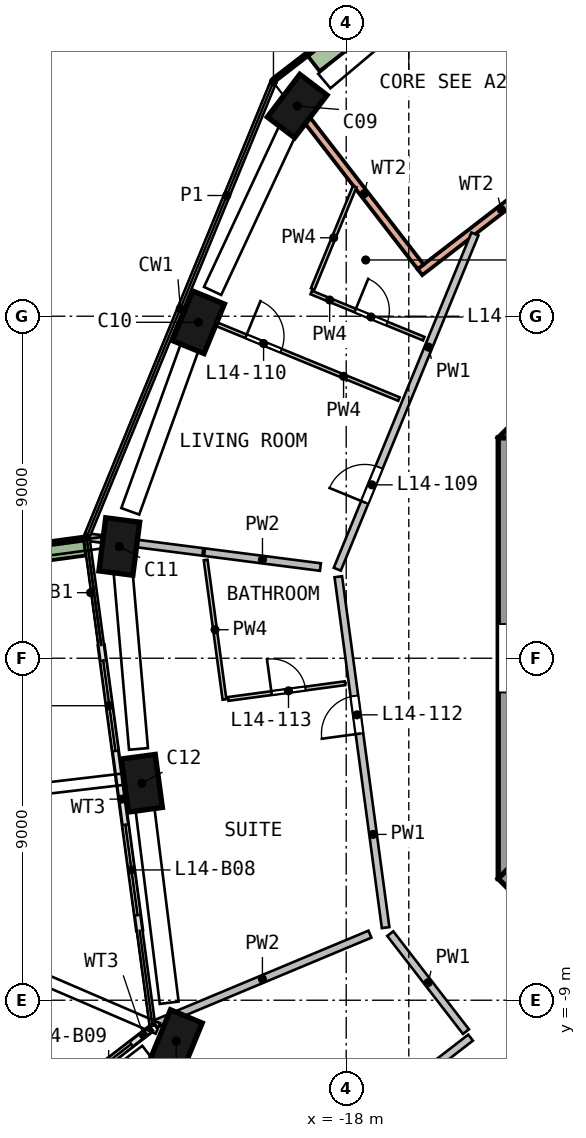
"""IFC4 building model, lengths in metres.
Left out: names, types, materials, properties, quantities, classifications, styles, units other than length and angle.
Written with IfcOpenShell. Run it as: python <this file> out.ifc"""

import sys

from ifc_helpers import new_model, si_unit, direction, frame, frame_2d, origin, origin_2d, place, context, subcontext, project, spatial, rectangle, extrude, element, fill, save


model = new_model("IFC4")
c1 = context("Model", 3, precision=1e-05, world=origin(), true_north=direction((0.0, 1.0)))
c2 = subcontext(c1, "Body", "Model", "MODEL_VIEW")
j1 = project(units=[si_unit("LENGTHUNIT", "METRE"), si_unit("PLANEANGLEUNIT", "RADIAN")], contexts=[c1])
p1 = place(None, origin())
s1 = spatial("IfcSite", under=j1, at=p1, CompositionType="ELEMENT")
p2 = place(p1, origin())
s2 = spatial("IfcBuilding", under=s1, at=p2, CompositionType="ELEMENT")
p3 = place(p2, frame((0.0, 0.0, 64.5)))
s3 = spatial("IfcBuildingStorey", under=s2, at=p3, CompositionType="ELEMENT", Elevation=64.5)
p4 = place(p3, frame((-19.207, 14.642, 0.0), z_axis=(-0.068881333, -0.091917805, 0.993381336), x_axis=(0.602440635, 0.789856126, 0.114858968)))
e1 = element("IfcColumn", 1, at=p4, inside=s3, PredefinedType="COLUMN", context=c2, shape_type="SweptSolid", body=[
    extrude(rectangle(XDim=1.4, YDim=0.9, at=origin_2d()), origin(), (0.0, 0.0, 1.0), 3.211),
])
p5 = place(p3, frame((-21.84, 8.966, 0.0), z_axis=(-0.041751597, -0.104264917, 0.993672799), x_axis=(-0.377203026, -0.919295603, -0.112309715)))
e2 = element("IfcColumn", 2, at=p5, inside=s3, PredefinedType="COLUMN", context=c2, shape_type="SweptSolid", body=[
    extrude(rectangle(XDim=1.4, YDim=0.9, at=origin_2d()), origin(), (0.0, 0.0, 1.0), 3.21),
])
p6 = place(p3, frame((-23.954, 3.077, 0.0), z_axis=(-0.013685038, -0.11404198, 0.993381672), x_axis=(0.126725729, 0.985265789, 0.114856063)))
e3 = element("IfcColumn", 3, at=p6, inside=s3, PredefinedType="COLUMN", context=c2, shape_type="SweptSolid", body=[
    extrude(rectangle(XDim=1.4, YDim=0.9, at=origin_2d()), origin(), (0.0, 0.0, 1.0), 3.211),
])
p7 = place(p3, frame((-23.396, -3.155, 0.0), z_axis=(0.015894502, -0.111185465, 0.99367256), x_axis=(0.132268988, -0.984830426, -0.112311825)))
e4 = element("IfcColumn", 4, at=p7, inside=s3, PredefinedType="COLUMN", context=c2, shape_type="SweptSolid", body=[
    extrude(rectangle(XDim=1.4, YDim=0.9, at=origin_2d()), origin(), (0.0, 0.0, 1.0), 3.21),
])
p8 = place(p3, frame((-22.531, -9.947, 0.0), z_axis=(0.048189103, -0.106715301, 0.993121168), x_axis=(0.384858394, 0.91949082, 0.080128952)))
e5 = element("IfcColumn", 5, at=p8, inside=s3, PredefinedType="COLUMN", context=c2, shape_type="SweptSolid", body=[
    extrude(rectangle(XDim=1.4, YDim=0.9, at=origin_2d()), origin(), (0.0, 0.0, 1.0), 3.212),
])
p9 = place(p3, frame((-5.481, 13.682, 0.0), z_axis=(0.0, 0.0, 1.0), x_axis=(-0.707106781, -0.707106781, 0.0)))
e6 = element("IfcWall", 6, at=p9, inside=s3, PredefinedType="SHEAR", context=c2, shape_type="SweptSolid", body=[
    extrude(rectangle(XDim=11.598, YDim=0.9, at=frame_2d((5.799, 0.0))), origin(), (0.0, 0.0, 1.0), 3.5),
])
p10 = place(p3, frame((-13.55, 5.799, 0.0), z_axis=(0.0, 0.0, 1.0), x_axis=(0.0, -1.0, 0.0)))
e7 = element("IfcWall", 7, at=p10, inside=s3, PredefinedType="SHEAR", context=c2, shape_type="SweptSolid", body=[
    extrude(rectangle(XDim=11.598, YDim=0.9, at=frame_2d((5.799, 0.0))), origin(), (0.0, 0.0, 1.0), 3.5),
])
p11 = place(p10, frame((4.899, 0.0, 0.0)))
e8 = element("IfcOpeningElement", 8, at=p11, cuts=e7, PredefinedType="OPENING", context=c2, shape_type="SweptSolid", body=[
    extrude(rectangle(XDim=1.8, YDim=2.1, at=frame_2d((0.9, 1.05))), frame((0.0, 0.46, 0.0), z_axis=(0.0, -1.0, 0.0), x_axis=(1.0, 0.0, 0.0)), (0.0, 0.0, 1.0), 0.92),
])
p12 = place(p3, frame((-13.682, -5.481, 0.0), z_axis=(0.0, 0.0, 1.0), x_axis=(0.707106781, -0.707106781, 0.0)))
e9 = element("IfcWall", 9, at=p12, inside=s3, PredefinedType="SHEAR", context=c2, shape_type="SweptSolid", body=[
    extrude(rectangle(XDim=11.598, YDim=0.9, at=frame_2d((5.799, 0.0))), origin(), (0.0, 0.0, 1.0), 3.5),
])
p13 = place(p12, frame((2.099, 0.0, 0.0)))
e10 = element("IfcOpeningElement", 10, at=p13, cuts=e9, PredefinedType="OPENING", context=c2, shape_type="SweptSolid", body=[
    extrude(rectangle(XDim=1.2, YDim=2.1, at=frame_2d((0.6, 1.05))), frame((0.0, 0.46, 0.0), z_axis=(0.0, -1.0, 0.0), x_axis=(1.0, 0.0, 0.0)), (0.0, 0.0, 1.0), 0.92),
])
p14 = place(p3, frame((-24.448, 0.336, 0.0), z_axis=(0.0, 0.0, 1.0), x_axis=(0.133660502, -0.991027179, 0.0)))
e11 = element("IfcWall", 11, at=p14, inside=s3, PredefinedType="SOLIDWALL", context=c2, shape_type="SweptSolid", body=[
    extrude(rectangle(XDim=3.6, YDim=0.15, at=frame_2d((1.8, 0.0))), origin(), (0.0, 0.0, 1.0), 2.425),
])
p15 = place(p14, frame((0.4, 0.0, 0.0)))
e12 = element("IfcOpeningElement", 12, at=p15, cuts=e11, PredefinedType="OPENING", context=c2, shape_type="SweptSolid", body=[
    extrude(rectangle(XDim=2.4, YDim=2.4, at=frame_2d((1.2, 1.2))), frame((0.0, 0.085, 0.0), z_axis=(0.0, -1.0, 0.0), x_axis=(1.0, 0.0, 0.0)), (0.0, 0.0, 1.0), 0.17),
])
p16 = place(p3, frame((-23.966, -3.232, 0.0), z_axis=(0.0, 0.0, 1.0), x_axis=(0.133649548, -0.991028657, 0.0)))
e13 = element("IfcWall", 13, at=p16, inside=s3, PredefinedType="SOLIDWALL", context=c2, shape_type="SweptSolid", body=[
    extrude(rectangle(XDim=3.96, YDim=0.15, at=frame_2d((1.98, 0.0))), origin(), (0.0, 0.0, 1.0), 2.425),
])
p17 = place(p16, frame((1.16, 0.0, 0.0)))
e14 = element("IfcOpeningElement", 14, at=p17, cuts=e13, PredefinedType="OPENING", context=c2, shape_type="SweptSolid", body=[
    extrude(rectangle(XDim=2.4, YDim=2.4, at=frame_2d((1.2, 1.2))), frame((0.0, 0.085, 0.0), z_axis=(0.0, -1.0, 0.0), x_axis=(1.0, 0.0, 0.0)), (0.0, 0.0, 1.0), 0.17),
])
p18 = place(p3, frame((-23.182, -9.786, 0.0), z_axis=(0.0, 0.0, 1.0), x_axis=(-0.791418042, -0.611275292, 0.0)))
e15 = element("IfcWall", 15, at=p18, inside=s3, PredefinedType="SOLIDWALL", context=c2, shape_type="SweptSolid", body=[
    extrude(rectangle(XDim=2.502, YDim=0.15, at=frame_2d((1.251, 0.0))), origin(), (0.0, 0.0, 1.0), 2.425),
])
p19 = place(p18, frame((0.602, 0.0, 0.0)))
e16 = element("IfcOpeningElement", 16, at=p19, cuts=e15, PredefinedType="OPENING", context=c2, shape_type="SweptSolid", body=[
    extrude(rectangle(XDim=1.5, YDim=2.4, at=frame_2d((0.75, 1.2))), frame((0.0, 0.085, 0.0), z_axis=(0.0, -1.0, 0.0), x_axis=(1.0, 0.0, 0.0)), (0.0, 0.0, 1.0), 0.17),
])
p20 = place(p3, frame((-24.877, 2.952, 0.0), z_axis=(0.0, 0.0, 1.0), x_axis=(-0.991031531, -0.133628231, 0.0)))
e17 = element("IfcWall", 17, at=p20, inside=s3, PredefinedType="SOLIDWALL", context=c2, shape_type="SweptSolid", body=[
    extrude(rectangle(XDim=3.199, YDim=0.5, at=frame_2d((1.6, 0.0))), origin(), (0.0, 0.0, 1.0), 0.7),
])
p21 = place(p3, frame((-16.06, 10.161, 0.0), z_axis=(0.0, 0.0, 1.0), x_axis=(0.791439855, 0.61124705, 0.0)))
e18 = element("IfcWall", 18, at=p21, inside=s3, PredefinedType="SOLIDWALL", context=c2, shape_type="SweptSolid", body=[
    extrude(rectangle(XDim=13.0, YDim=0.2, at=frame_2d((6.5, 0.0))), origin(), (0.0, 0.0, 1.0), 3.19),
])
p22 = place(p21, frame((5.6, 0.0, 0.0)))
e19 = element("IfcOpeningElement", 19, at=p22, cuts=e18, PredefinedType="OPENING", context=c2, shape_type="SweptSolid", body=[
    extrude(rectangle(XDim=1.8, YDim=2.4, at=frame_2d((0.9, 1.2))), frame((0.0, 0.11, 0.0), z_axis=(0.0, -1.0, 0.0), x_axis=(1.0, 0.0, 0.0)), (0.0, 0.0, 1.0), 0.22),
])
p23 = place(p3, frame((-19.013, 14.148, 0.0), z_axis=(0.0, 0.0, 1.0), x_axis=(0.611238783, -0.79144624, 0.0)))
e20 = element("IfcWall", 20, at=p23, inside=s3, PredefinedType="SOLIDWALL", context=c2, shape_type="SweptSolid", body=[
    extrude(rectangle(XDim=4.861, YDim=0.2, at=frame_2d((2.43, 0.0))), origin(), (0.0, 0.0, 1.0), 3.19),
])
p24 = place(p3, frame((-9.716, 23.083, 0.0), z_axis=(0.0, 0.0, 1.0), x_axis=(-0.791441368, -0.611245091, 0.0)))
e21 = element("IfcWall", 21, at=p24, inside=s3, PredefinedType="SOLIDWALL", context=c2, shape_type="SweptSolid", body=[
    extrude(rectangle(XDim=12.84, YDim=0.1, at=frame_2d((6.42, 0.0))), origin(), (0.0, 0.0, 1.0), 0.7),
])
p25 = place(p3, frame((-15.532, 18.213, 0.0), z_axis=(0.0, 0.0, 1.0), x_axis=(-0.791433349, -0.611255474, 0.0)))
e22 = element("IfcWall", 22, at=p25, inside=s3, PredefinedType="SOLIDWALL", context=c2, shape_type="SweptSolid", body=[
    extrude(rectangle(XDim=4.198, YDim=0.5, at=frame_2d((2.099, 0.0))), origin(), (0.0, 0.0, 1.0), 0.7),
])
p26 = place(p3, frame((-27.486, -19.838, 0.0), z_axis=(0.0, 0.0, 1.0), x_axis=(0.791431192, 0.611258267, 0.0)))
e23 = element("IfcWall", 23, at=p26, inside=s3, PredefinedType="SOLIDWALL", context=c2, shape_type="SweptSolid", body=[
    extrude(rectangle(XDim=16.121, YDim=0.2, at=frame_2d((8.061, 0.0))), origin(), (0.0, 0.0, 1.0), 3.19),
])
p27 = place(p26, frame((10.16, 0.0, 0.0)))
e24 = element("IfcOpeningElement", 24, at=p27, cuts=e23, PredefinedType="OPENING", context=c2, shape_type="SweptSolid", body=[
    extrude(rectangle(XDim=1.0, YDim=2.1, at=frame_2d((0.5, 1.05))), frame((0.0, 0.11, 0.0), z_axis=(0.0, -1.0, 0.0), x_axis=(1.0, 0.0, 0.0)), (0.0, 0.0, 1.0), 0.22),
])
p28 = place(p3, frame((-16.963, -7.089, 0.0), z_axis=(0.0, 0.0, 1.0), x_axis=(-0.133643157, 0.991029519, 0.0)))
e25 = element("IfcWall", 25, at=p28, inside=s3, PredefinedType="SOLIDWALL", context=c2, shape_type="SweptSolid", body=[
    extrude(rectangle(XDim=9.317, YDim=0.2, at=frame_2d((4.658, 0.0))), origin(), (0.0, 0.0, 1.0), 3.19),
])
p29 = place(p28, frame((5.15, 0.0, 0.0)))
e26 = element("IfcOpeningElement", 26, at=p29, cuts=e25, PredefinedType="OPENING", context=c2, shape_type="SweptSolid", body=[
    extrude(rectangle(XDim=1.0, YDim=2.1, at=frame_2d((0.5, 1.05))), frame((0.0, 0.11, 0.0), z_axis=(0.0, -1.0, 0.0), x_axis=(1.0, 0.0, 0.0)), (0.0, 0.0, 1.0), 0.22),
])
p30 = place(p3, frame((-18.235, 2.342, 0.0), z_axis=(0.0, 0.0, 1.0), x_axis=(0.379774903, 0.925078928, 0.0)))
e27 = element("IfcWall", 27, at=p30, inside=s3, PredefinedType="SOLIDWALL", context=c2, shape_type="SweptSolid", body=[
    extrude(rectangle(XDim=9.537, YDim=0.2, at=frame_2d((4.769, 0.0))), origin(), (0.0, 0.0, 1.0), 3.19),
])
p31 = place(p30, frame((1.9, 0.0, 0.0)))
e28 = element("IfcOpeningElement", 28, at=p31, cuts=e27, PredefinedType="OPENING", context=c2, shape_type="SweptSolid", body=[
    extrude(rectangle(XDim=1.0, YDim=2.1, at=frame_2d((0.5, 1.05))), frame((0.0, 0.11, 0.0), z_axis=(0.0, -1.0, 0.0), x_axis=(1.0, 0.0, 0.0)), (0.0, 0.0, 1.0), 0.22),
])
p32 = place(p3, frame((-16.841, -7.247, 0.0), z_axis=(0.0, 0.0, 1.0), x_axis=(0.611281148, -0.791413519, 0.0)))
e29 = element("IfcWall", 29, at=p32, inside=s3, PredefinedType="SOLIDWALL", context=c2, shape_type="SweptSolid", body=[
    extrude(rectangle(XDim=3.258, YDim=0.2, at=frame_2d((1.629, 0.0))), origin(), (0.0, 0.0, 1.0), 3.19),
])
p33 = place(p3, frame((-21.774, 2.797, 0.0), z_axis=(0.0, 0.0, 1.0), x_axis=(-0.991855686, 0.127366788, 0.0)))
e30 = element("IfcWall", 30, at=p33, inside=s3, PredefinedType="SOLIDWALL", context=c2, shape_type="SweptSolid", body=[
    extrude(rectangle(XDim=3.011, YDim=0.2, at=frame_2d((1.506, 0.0))), origin(), (0.0, 0.0, 1.0), 3.19),
])
p34 = place(p3, frame((-17.376, -7.261, 0.0), z_axis=(0.0, 0.0, 1.0), x_axis=(-0.922670031, -0.385590475, 0.0)))
e31 = element("IfcWall", 31, at=p34, inside=s3, PredefinedType="SOLIDWALL", context=c2, shape_type="SweptSolid", body=[
    extrude(rectangle(XDim=6.132, YDim=0.2, at=frame_2d((3.066, 0.0))), origin(), (0.0, 0.0, 1.0), 3.19),
])
p35 = place(p3, frame((-18.678, 2.399, 0.0), z_axis=(0.0, 0.0, 1.0), x_axis=(-0.991846962, 0.127434708, 0.0)))
e32 = element("IfcWall", 32, at=p35, inside=s3, PredefinedType="SOLIDWALL", context=c2, shape_type="SweptSolid", body=[
    extrude(rectangle(XDim=3.075, YDim=0.2, at=frame_2d((1.538, 0.0))), origin(), (0.0, 0.0, 1.0), 3.19),
])
p36 = place(p3, frame((-21.204, -1.085, 0.0), z_axis=(0.0, 0.0, 1.0), x_axis=(-0.13360997, 0.991033993, 0.0)))
e33 = element("IfcWall", 33, at=p36, inside=s3, PredefinedType="PARTITIONING", context=c2, shape_type="SweptSolid", body=[
    extrude(rectangle(XDim=3.704, YDim=0.1, at=frame_2d((1.852, 0.0))), origin(), (0.0, 0.0, 1.0), 3.19),
])
p37 = place(p3, frame((-21.104, -1.072, 0.0), z_axis=(0.0, 0.0, 1.0), x_axis=(0.991029396, 0.133644063, 0.0)))
e34 = element("IfcWall", 34, at=p37, inside=s3, PredefinedType="PARTITIONING", context=c2, shape_type="SweptSolid", body=[
    extrude(rectangle(XDim=3.1, YDim=0.1, at=frame_2d((1.55, 0.0))), origin(), (0.0, 0.0, 1.0), 3.19),
])
p38 = place(p37, frame((1.15, 0.0, 0.0)))
e35 = element("IfcOpeningElement", 35, at=p38, cuts=e34, PredefinedType="OPENING", context=c2, shape_type="SweptSolid", body=[
    extrude(rectangle(XDim=0.9, YDim=2.1, at=frame_2d((0.45, 1.05))), frame((0.0, 0.06, 0.0), z_axis=(0.0, -1.0, 0.0), x_axis=(1.0, 0.0, 0.0)), (0.0, 0.0, 1.0), 0.12),
])
p39 = place(p3, frame((-22.302, 9.156, 0.0), z_axis=(0.0, 0.0, 1.0), x_axis=(0.925087816, -0.379753253, 0.0)))
e36 = element("IfcWall", 36, at=p39, inside=s3, PredefinedType="PARTITIONING", context=c2, shape_type="SweptSolid", body=[
    extrude(rectangle(XDim=6.15, YDim=0.1, at=frame_2d((3.075, 0.0))), origin(), (0.0, 0.0, 1.0), 3.19),
])
p40 = place(p39, frame((1.8, 0.0, 0.0)))
e37 = element("IfcOpeningElement", 37, at=p40, cuts=e36, PredefinedType="OPENING", context=c2, shape_type="SweptSolid", body=[
    extrude(rectangle(XDim=1.0, YDim=2.1, at=frame_2d((0.5, 1.05))), frame((0.0, 0.06, 0.0), z_axis=(0.0, -1.0, 0.0), x_axis=(1.0, 0.0, 0.0)), (0.0, 0.0, 1.0), 0.12),
])
p41 = place(p3, frame((-17.777, 12.411, 0.0), z_axis=(0.0, 0.0, 1.0), x_axis=(-0.379788186, -0.925073475, 0.0)))
e38 = element("IfcWall", 38, at=p41, inside=s3, PredefinedType="PARTITIONING", context=c2, shape_type="SweptSolid", body=[
    extrude(rectangle(XDim=2.912, YDim=0.1, at=frame_2d((1.456, 0.0))), origin(), (0.0, 0.0, 1.0), 3.19),
])
p42 = place(p3, frame((-18.92, 9.625, 0.0), z_axis=(0.0, 0.0, 1.0), x_axis=(0.925097844, -0.379728822, 0.0)))
e39 = element("IfcWall", 39, at=p42, inside=s3, PredefinedType="PARTITIONING", context=c2, shape_type="SweptSolid", body=[
    extrude(rectangle(XDim=3.2, YDim=0.1, at=frame_2d((1.6, 0.0))), origin(), (0.0, 0.0, 1.0), 3.19),
])
p43 = place(p42, frame((1.25, 0.0, 0.0)))
e40 = element("IfcOpeningElement", 40, at=p43, cuts=e39, PredefinedType="OPENING", context=c2, shape_type="SweptSolid", body=[
    extrude(rectangle(XDim=0.9, YDim=2.1, at=frame_2d((0.45, 1.05))), frame((0.0, 0.06, 0.0), z_axis=(0.0, -1.0, 0.0), x_axis=(1.0, 0.0, 0.0)), (0.0, 0.0, 1.0), 0.12),
])
p44 = place(p15, origin())
e41 = element("IfcDoor", 41, at=p44, inside=s3, OperationType="SLIDING_TO_RIGHT", PredefinedType="DOOR", context=c2, shape_type="SweptSolid", body=[
    extrude(rectangle(XDim=2.4, YDim=2.4, at=frame_2d((1.2, 1.2))), frame((0.0, 0.025, 0.0), z_axis=(0.0, -1.0, 0.0), x_axis=(1.0, 0.0, 0.0)), (0.0, 0.0, 1.0), 0.05),
])
fill(e12, e41)
p45 = place(p17, origin())
e42 = element("IfcDoor", 42, at=p45, inside=s3, OperationType="SLIDING_TO_LEFT", PredefinedType="DOOR", context=c2, shape_type="SweptSolid", body=[
    extrude(rectangle(XDim=2.4, YDim=2.4, at=frame_2d((1.2, 1.2))), frame((0.0, 0.025, 0.0), z_axis=(0.0, -1.0, 0.0), x_axis=(1.0, 0.0, 0.0)), (0.0, 0.0, 1.0), 0.05),
])
fill(e14, e42)
p46 = place(p19, origin())
e43 = element("IfcDoor", 43, at=p46, inside=s3, OperationType="SLIDING_TO_LEFT", PredefinedType="DOOR", context=c2, shape_type="SweptSolid", body=[
    extrude(rectangle(XDim=1.5, YDim=2.4, at=frame_2d((0.75, 1.2))), frame((0.0, 0.025, 0.0), z_axis=(0.0, -1.0, 0.0), x_axis=(1.0, 0.0, 0.0)), (0.0, 0.0, 1.0), 0.05),
])
fill(e16, e43)
p47 = place(p31, origin())
e44 = element("IfcDoor", 44, at=p47, inside=s3, OperationType="SINGLE_SWING_LEFT", PredefinedType="DOOR", context=c2, shape_type="SweptSolid", body=[
    extrude(rectangle(XDim=1.0, YDim=2.1, at=frame_2d((0.5, 1.05))), frame((0.0, 0.025, 0.0), z_axis=(0.0, -1.0, 0.0), x_axis=(1.0, 0.0, 0.0)), (0.0, 0.0, 1.0), 0.05),
])
fill(e28, e44)
p48 = place(p40, origin())
e45 = element("IfcDoor", 45, at=p48, inside=s3, OperationType="SINGLE_SWING_LEFT", PredefinedType="DOOR", context=c2, shape_type="SweptSolid", body=[
    extrude(rectangle(XDim=1.0, YDim=2.1, at=frame_2d((0.5, 1.05))), frame((0.0, 0.025, 0.0), z_axis=(0.0, -1.0, 0.0), x_axis=(1.0, 0.0, 0.0)), (0.0, 0.0, 1.0), 0.05),
])
fill(e37, e45)
p49 = place(p43, origin())
e46 = element("IfcDoor", 46, at=p49, inside=s3, OperationType="SINGLE_SWING_LEFT", PredefinedType="DOOR", context=c2, shape_type="SweptSolid", body=[
    extrude(rectangle(XDim=0.9, YDim=2.1, at=frame_2d((0.45, 1.05))), frame((0.0, 0.025, 0.0), z_axis=(0.0, -1.0, 0.0), x_axis=(1.0, 0.0, 0.0)), (0.0, 0.0, 1.0), 0.05),
])
fill(e40, e46)
p50 = place(p29, origin())
e47 = element("IfcDoor", 47, at=p50, inside=s3, OperationType="SINGLE_SWING_LEFT", PredefinedType="DOOR", context=c2, shape_type="SweptSolid", body=[
    extrude(rectangle(XDim=1.0, YDim=2.1, at=frame_2d((0.5, 1.05))), frame((0.0, 0.025, 0.0), z_axis=(0.0, -1.0, 0.0), x_axis=(1.0, 0.0, 0.0)), (0.0, 0.0, 1.0), 0.05),
])
fill(e26, e47)
p51 = place(p38, origin())
e48 = element("IfcDoor", 48, at=p51, inside=s3, OperationType="SINGLE_SWING_LEFT", PredefinedType="DOOR", context=c2, shape_type="SweptSolid", body=[
    extrude(rectangle(XDim=0.9, YDim=2.1, at=frame_2d((0.45, 1.05))), frame((0.0, 0.025, 0.0), z_axis=(0.0, -1.0, 0.0), x_axis=(1.0, 0.0, 0.0)), (0.0, 0.0, 1.0), 0.05),
])
fill(e35, e48)
save(model, sys.argv[1])
